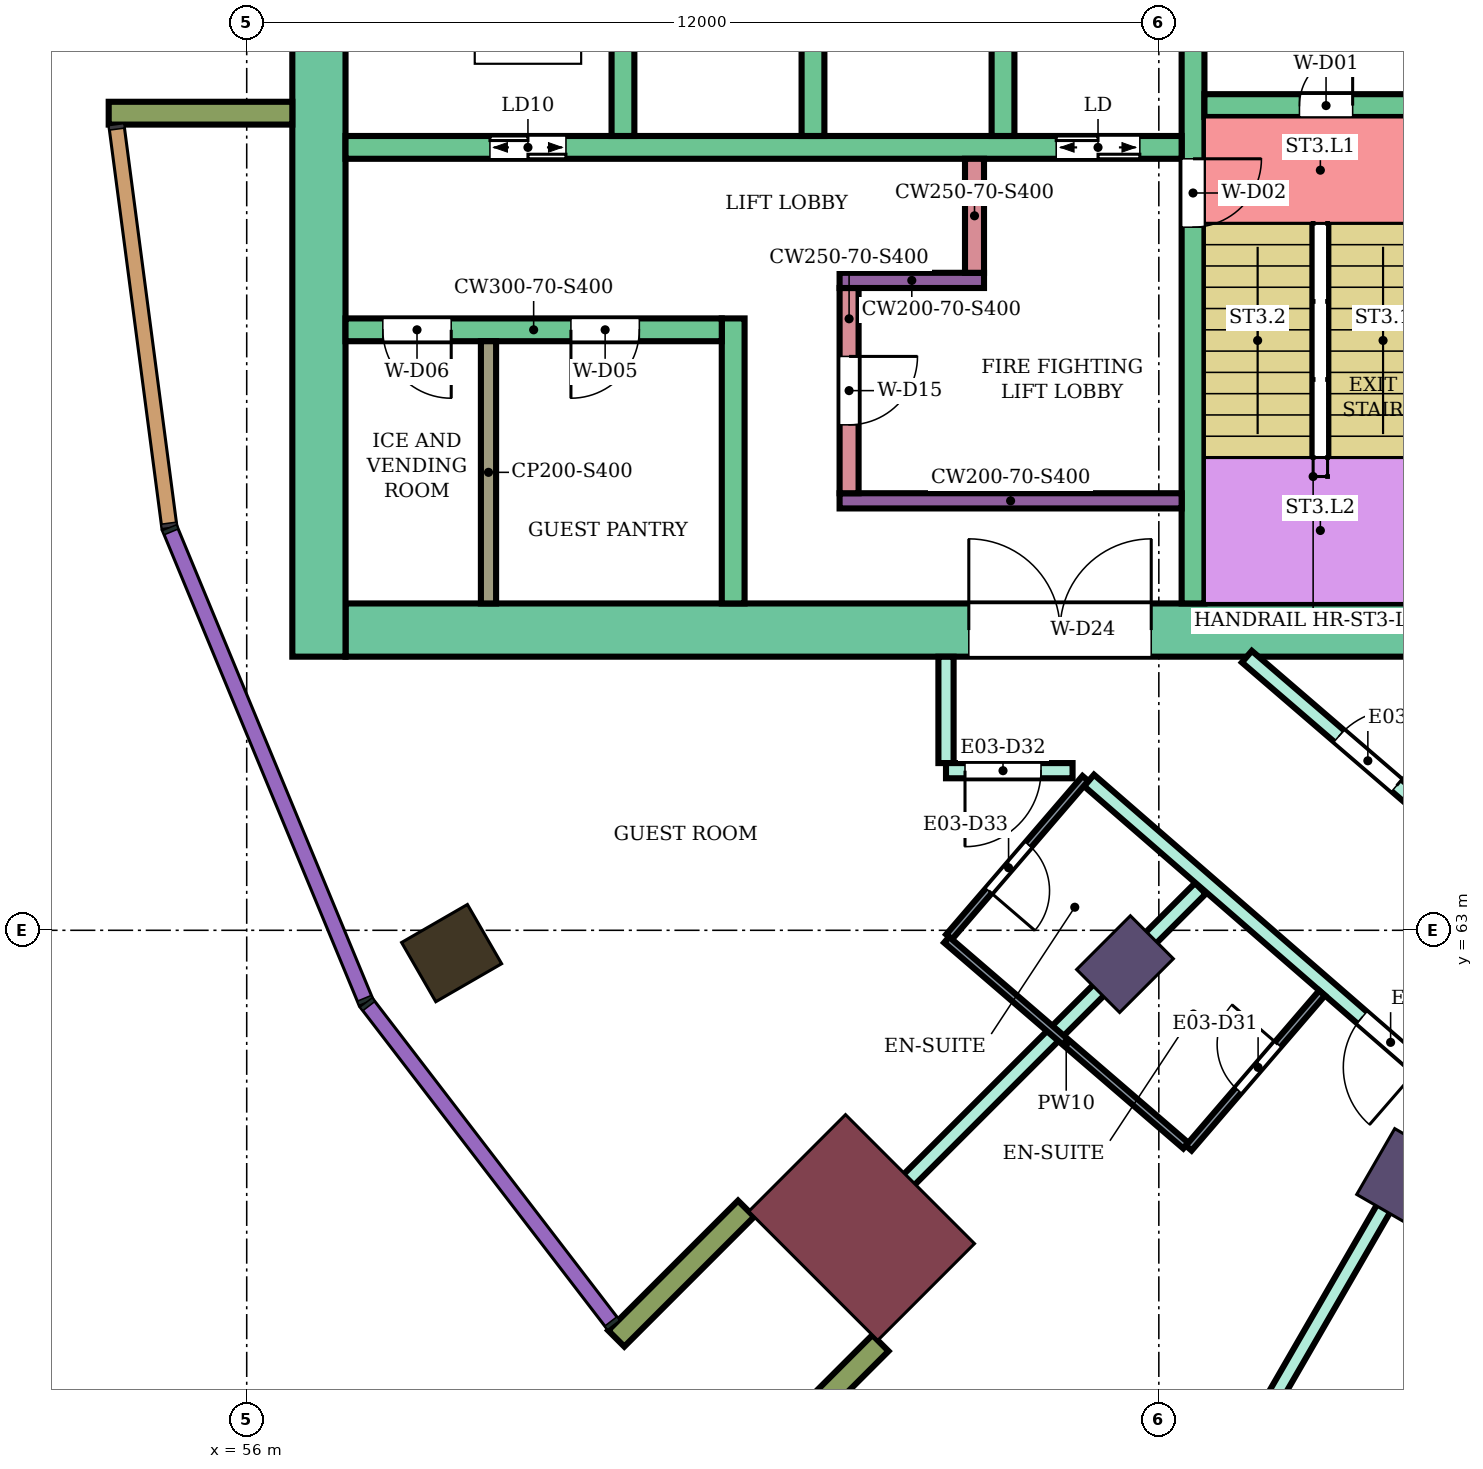
"""IFC4 building model, lengths in metres.
Left out: names, types, materials, properties, quantities, classifications, styles, units other than length and angle.
Written with IfcOpenShell. Run it as: python <this file> out.ifc"""

import sys

from ifc_helpers import new_model, si_unit, direction, frame, frame_2d, origin, origin_2d, place, context, subcontext, project, spatial, rectangle, extrude, element, fill, save


model = new_model("IFC4")
c1 = context("Model", 3, precision=1e-05, world=origin(), true_north=direction((0.0, 1.0)))
c2 = subcontext(c1, "Body", "Model", "MODEL_VIEW")
j1 = project(units=[si_unit("LENGTHUNIT", "METRE"), si_unit("PLANEANGLEUNIT", "RADIAN")], contexts=[c1])
p1 = place(None, origin())
s1 = spatial("IfcSite", under=j1, at=p1, CompositionType="ELEMENT")
p2 = place(p1, origin())
s2 = spatial("IfcBuilding", under=s1, at=p2, CompositionType="ELEMENT")
p3 = place(p2, frame((0.0, 0.0, 145.8)))
s3 = spatial("IfcBuildingStorey", under=s2, at=p3, CompositionType="ELEMENT", Elevation=145.8)
p4 = place(p3, frame((58.696, 62.7, 0.0), z_axis=(0.0, 0.0, 1.0), x_axis=(-0.866025403784, -0.5, 0.0)))
e1 = element("IfcColumn", 1, at=p4, inside=s3, PredefinedType="COLUMN", context=c2, shape_type="SweptSolid", body=[
    extrude(rectangle(XDim=1.0, YDim=0.9, at=origin_2d()), origin(), (0.0, 0.0, 1.0), 3.9),
])
for number, where, z_axis, x_axis in (
    (2, (67.555, 62.555, 0.0), (0.0, 0.0, 1.0), (-0.707, -0.707, 0.0)),
    (3, (71.2, 59.758, 0.0), (0.0, 0.0, 1.0), (-0.5, -0.866, 0.0)),
):
    element("IfcColumn", number, at=place(p3, frame(where, z_axis=z_axis, x_axis=x_axis)), inside=s3, PredefinedType="COLUMN", context=c2, shape_type="SweptSolid", body=[
        extrude(rectangle(XDim=1.0, YDim=0.8, at=origin_2d()), origin(), (0.0, 0.0, 1.0), 3.9),
    ])
p5 = place(p3, frame((64.09, 59.09, 0.0), z_axis=(0.0, 0.0, 1.0), x_axis=(-0.707106781187, -0.707106781187, 0.0)))
e4 = element("IfcColumn", 4, at=p5, inside=s3, PredefinedType="COLUMN", context=c2, shape_type="SweptSolid", body=[
    extrude(rectangle(XDim=1.8, YDim=2.4, at=origin_2d()), origin(), (0.0, 0.0, 1.0), 3.9),
])
p6 = place(p3, frame((72.1, 66.95, 0.0), z_axis=(0.0, 0.0, 1.0), x_axis=(-1.0, 0.0, 0.0)))
e5 = element("IfcWall", 5, at=p6, inside=s3, PredefinedType="SHEAR", context=c2, shape_type="SweptSolid", body=[
    extrude(rectangle(XDim=14.8, YDim=0.7, at=frame_2d((7.4, 0.0))), origin(), (0.0, 0.0, 1.0), 3.5),
])
p7 = place(p6, frame((4.2, 0.0, 0.0)))
e6 = element("IfcOpeningElement", 6, at=p7, cuts=e5, PredefinedType="OPENING", context=c2, shape_type="SweptSolid", body=[
    extrude(rectangle(XDim=2.4, YDim=2.4, at=frame_2d((1.2, 1.2))), frame((0.0, 0.36, 0.0), z_axis=(0.0, -1.0, 0.0), x_axis=(1.0, 0.0, 0.0)), (0.0, 0.0, 1.0), 0.72),
])
p8 = place(p3, frame((56.95, 83.4, 0.0), z_axis=(0.0, 0.0, 1.0), x_axis=(0.0, -1.0, 0.0)))
e7 = element("IfcWall", 7, at=p8, inside=s3, PredefinedType="SHEAR", context=c2, shape_type="SweptSolid", body=[
    extrude(rectangle(XDim=16.8, YDim=0.7, at=frame_2d((8.4, 0.0))), origin(), (0.0, 0.0, 1.0), 3.5),
])
p9 = place(p3, frame((68.45, 75.0, 0.0), z_axis=(0.0, 0.0, 1.0), x_axis=(0.0, -1.0, 0.0)))
e8 = element("IfcWall", 8, at=p9, inside=s3, PredefinedType="SHEAR", context=c2, shape_type="SweptSolid", body=[
    extrude(rectangle(XDim=7.7, YDim=0.3, at=frame_2d((3.85, 0.0))), origin(), (0.0, 0.0, 1.0), 3.5),
])
p10 = place(p9, frame((1.85, 0.0, 0.0)))
e9 = element("IfcOpeningElement", 9, at=p10, cuts=e8, PredefinedType="OPENING", context=c2, shape_type="SweptSolid", body=[
    extrude(rectangle(XDim=0.9, YDim=2.1, at=frame_2d((0.45, 1.05))), frame((0.0, 0.16, 0.0), z_axis=(0.0, -1.0, 0.0), x_axis=(1.0, 0.0, 0.0)), (0.0, 0.0, 1.0), 0.32),
])
p11 = place(p3, frame((71.65, 73.85, 0.0), z_axis=(0.0, 0.0, 1.0), x_axis=(-1.0, 0.0, 0.0)))
e10 = element("IfcWall", 10, at=p11, inside=s3, PredefinedType="SHEAR", context=c2, shape_type="SweptSolid", body=[
    extrude(rectangle(XDim=3.05, YDim=0.3, at=frame_2d((1.525, 0.0))), origin(), (0.0, 0.0, 1.0), 3.5),
])
p12 = place(p11, frame((1.1, 0.0, 0.0)))
e11 = element("IfcOpeningElement", 11, at=p12, cuts=e10, PredefinedType="OPENING", context=c2, shape_type="SweptSolid", body=[
    extrude(rectangle(XDim=0.7, YDim=2.0, at=frame_2d((0.35, 1.0))), frame((0.0, 0.16, 0.0), z_axis=(0.0, -1.0, 0.0), x_axis=(1.0, 0.0, 0.0)), (0.0, 0.0, 1.0), 0.32),
])
p13 = place(p3, frame((68.3, 73.3, 0.0), z_axis=(0.0, 0.0, 1.0), x_axis=(-1.0, 0.0, 0.0)))
e12 = element("IfcWall", 12, at=p13, inside=s3, PredefinedType="SHEAR", context=c2, shape_type="SweptSolid", body=[
    extrude(rectangle(XDim=11.0, YDim=0.3, at=frame_2d((5.5, 0.0))), origin(), (0.0, 0.0, 1.0), 3.5),
])
p14 = place(p13, frame((0.55, 0.0, 0.0)))
e13 = element("IfcOpeningElement", 13, at=p14, cuts=e12, PredefinedType="OPENING", context=c2, shape_type="SweptSolid", body=[
    extrude(rectangle(XDim=1.1, YDim=2.1, at=frame_2d((0.55, 1.05))), frame((0.0, 0.16, 0.0), z_axis=(0.0, -1.0, 0.0), x_axis=(1.0, 0.0, 0.0)), (0.0, 0.0, 1.0), 0.32),
])
p15 = place(p13, frame((8.1, 0.0, 0.0)))
e14 = element("IfcOpeningElement", 14, at=p15, cuts=e12, PredefinedType="OPENING", context=c2, shape_type="SweptSolid", body=[
    extrude(rectangle(XDim=1.0, YDim=2.1, at=frame_2d((0.5, 1.05))), frame((0.0, 0.16, 0.0), z_axis=(0.0, -1.0, 0.0), x_axis=(1.0, 0.0, 0.0)), (0.0, 0.0, 1.0), 0.32),
])
for number, where, z_axis, x_axis in (
    (15, (65.95, 76.0, 0.0), (0.0, 0.0, 1.0), (0.0, -1.0, 0.0)),
    (16, (63.45, 76.0, 0.0), (0.0, 0.0, 1.0), (0.0, -1.0, 0.0)),
    (17, (60.95, 76.0, 0.0), (0.0, 0.0, 1.0), (0.0, -1.0, 0.0)),
):
    element("IfcWall", number, at=place(p3, frame(where, z_axis=z_axis, x_axis=x_axis)), inside=s3, PredefinedType="SHEAR", context=c2, shape_type="SweptSolid", body=[
        extrude(rectangle(XDim=2.55, YDim=0.3, at=frame_2d((1.275, 0.0))), origin(), (0.0, 0.0, 1.0), 3.5),
    ])
p16 = place(p3, frame((68.3, 68.65, 0.0), z_axis=(0.0, 0.0, 1.0), x_axis=(-1.0, 0.0, 0.0)))
e18 = element("IfcWall", 18, at=p16, inside=s3, PredefinedType="SHEAR", context=c2, shape_type="SweptSolid", body=[
    extrude(rectangle(XDim=4.5, YDim=0.2, at=frame_2d((2.25, 0.0))), origin(), (0.0, 0.0, 1.0), 3.5),
])
p17 = place(p3, frame((63.925, 71.45, 0.0), z_axis=(0.0, 0.0, 1.0), x_axis=(0.0, -1.0, 0.0)))
e19 = element("IfcWall", 19, at=p17, inside=s3, PredefinedType="SHEAR", context=c2, shape_type="SweptSolid", body=[
    extrude(rectangle(XDim=2.7, YDim=0.25, at=frame_2d((1.35, 0.0))), origin(), (0.0, 0.0, 1.0), 3.5),
])
p18 = place(p17, frame((0.9, 0.0, 0.0)))
e20 = element("IfcOpeningElement", 20, at=p18, cuts=e19, PredefinedType="OPENING", context=c2, shape_type="SweptSolid", body=[
    extrude(rectangle(XDim=0.9, YDim=2.1, at=frame_2d((0.45, 1.05))), frame((0.0, 0.135, 0.0), z_axis=(0.0, -1.0, 0.0), x_axis=(1.0, 0.0, 0.0)), (0.0, 0.0, 1.0), 0.27),
])
p19 = place(p3, frame((65.7, 71.55, 0.0), z_axis=(0.0, 0.0, 1.0), x_axis=(-1.0, 0.0, 0.0)))
e21 = element("IfcWall", 21, at=p19, inside=s3, PredefinedType="SHEAR", context=c2, shape_type="SweptSolid", body=[
    extrude(rectangle(XDim=1.9, YDim=0.2, at=frame_2d((0.95, 0.0))), origin(), (0.0, 0.0, 1.0), 3.5),
])
p20 = place(p3, frame((65.575, 73.15, 0.0), z_axis=(0.0, 0.0, 1.0), x_axis=(0.0, -1.0, 0.0)))
e22 = element("IfcWall", 22, at=p20, inside=s3, PredefinedType="SHEAR", context=c2, shape_type="SweptSolid", body=[
    extrude(rectangle(XDim=1.5, YDim=0.25, at=frame_2d((0.75, 0.0))), origin(), (0.0, 0.0, 1.0), 3.5),
])
p21 = place(p3, frame((62.4, 71.05, 0.0), z_axis=(0.0, 0.0, 1.0), x_axis=(0.0, -1.0, 0.0)))
e23 = element("IfcWall", 23, at=p21, inside=s3, PredefinedType="SHEAR", context=c2, shape_type="SweptSolid", body=[
    extrude(rectangle(XDim=3.75, YDim=0.3, at=frame_2d((1.875, 0.0))), origin(), (0.0, 0.0, 1.0), 3.5),
])
p22 = place(p3, frame((62.25, 70.9, 0.0), z_axis=(0.0, 0.0, 1.0), x_axis=(-1.0, 0.0, 0.0)))
e24 = element("IfcWall", 24, at=p22, inside=s3, PredefinedType="SHEAR", context=c2, shape_type="SweptSolid", body=[
    extrude(rectangle(XDim=4.95, YDim=0.3, at=frame_2d((2.475, 0.0))), origin(), (0.0, 0.0, 1.0), 3.5),
])
p23 = place(p22, frame((1.084, 0.0, 0.0)))
e25 = element("IfcOpeningElement", 25, at=p23, cuts=e24, PredefinedType="OPENING", context=c2, shape_type="SweptSolid", body=[
    extrude(rectangle(XDim=0.9, YDim=2.1, at=frame_2d((0.45, 1.05))), frame((0.0, 0.16, 0.0), z_axis=(0.0, -1.0, 0.0), x_axis=(1.0, 0.0, 0.0)), (0.0, 0.0, 1.0), 0.32),
])
p24 = place(p22, frame((3.56, 0.0, 0.0)))
e26 = element("IfcOpeningElement", 26, at=p24, cuts=e24, PredefinedType="OPENING", context=c2, shape_type="SweptSolid", body=[
    extrude(rectangle(XDim=0.9, YDim=2.1, at=frame_2d((0.45, 1.05))), frame((0.0, 0.16, 0.0), z_axis=(0.0, -1.0, 0.0), x_axis=(1.0, 0.0, 0.0)), (0.0, 0.0, 1.0), 0.32),
])
for number, where, z_axis, x_axis in (
    (27, (56.6, 73.75, 0.0), (0.0, 0.0, 1.0), (-1.0, 0.0, 0.0)),
    (28, (62.57, 59.338, 0.0), (0.0, 0.0, 1.0), (-0.707, -0.707, 0.0)),
    (29, (64.338, 57.57, 0.0), (0.0, 0.0, 1.0), (-0.707, -0.707, 0.0)),
):
    element("IfcWall", number, at=place(p3, frame(where, z_axis=z_axis, x_axis=x_axis)), inside=s3, PredefinedType="NOTDEFINED", context=c2, shape_type="SweptSolid", body=[
        extrude(rectangle(XDim=2.416, YDim=0.3, at=frame_2d((1.208, 0.0))), origin(), (0.0, 0.0, 1.0), 3.9),
    ])
p25 = place(p3, frame((63.593, 58.599, 0.0), z_axis=(0.0, 0.0, 1.0), x_axis=(0.707228748718, 0.706984792613, 0.0)))
e30 = element("IfcWall", 30, at=p25, inside=s3, PredefinedType="PARTITIONING", context=c2, shape_type="SweptSolid", body=[
    extrude(rectangle(XDim=7.005, YDim=0.2, at=frame_2d((3.503, 0.0))), origin(), (0.0, 0.0, 1.0), 3.45),
])
p26 = place(p3, frame((65.2, 65.2, 0.0), z_axis=(0.0, 0.0, 1.0), x_axis=(0.0, 1.0, 0.0)))
e31 = element("IfcWall", 31, at=p26, inside=s3, PredefinedType="PARTITIONING", context=c2, shape_type="SweptSolid", body=[
    extrude(rectangle(XDim=1.399, YDim=0.2, at=frame_2d((0.7, 0.0))), origin(), (0.0, 0.0, 1.0), 3.45),
])
p27 = place(p3, frame((65.2, 65.1, 0.0), z_axis=(0.0, 0.0, 1.0), x_axis=(1.0, 0.0, 0.0)))
e32 = element("IfcWall", 32, at=p27, inside=s3, PredefinedType="PARTITIONING", context=c2, shape_type="SweptSolid", body=[
    extrude(rectangle(XDim=1.665, YDim=0.2, at=frame_2d((0.833, 0.0))), origin(), (0.0, 0.0, 1.0), 3.45),
])
p28 = place(p27, frame((0.25, 0.0, 0.0)))
e33 = element("IfcOpeningElement", 33, at=p28, cuts=e32, PredefinedType="OPENING", context=c2, shape_type="SweptSolid", body=[
    extrude(rectangle(XDim=1.0, YDim=2.1, at=frame_2d((0.5, 1.05))), frame((0.0, 0.11, 0.0), z_axis=(0.0, -1.0, 0.0), x_axis=(1.0, 0.0, 0.0)), (0.0, 0.0, 1.0), 0.22),
])
p29 = place(p3, frame((67.082, 64.972, 0.0), z_axis=(0.0, 0.0, 1.0), x_axis=(0.755031061605, -0.65568902386, 0.0)))
e34 = element("IfcWall", 34, at=p29, inside=s3, PredefinedType="PARTITIONING", context=c2, shape_type="SweptSolid", body=[
    extrude(rectangle(XDim=6.186, YDim=0.2, at=frame_2d((3.093, 0.0))), origin(), (0.0, 0.0, 1.0), 3.45),
])
p30 = place(p29, frame((4.755, 0.0, 0.0)))
e35 = element("IfcOpeningElement", 35, at=p30, cuts=e34, PredefinedType="OPENING", context=c2, shape_type="SweptSolid", body=[
    extrude(rectangle(XDim=1.0, YDim=2.1, at=frame_2d((0.5, 1.05))), frame((0.0, 0.11, 0.0), z_axis=(0.0, -1.0, 0.0), x_axis=(1.0, 0.0, 0.0)), (0.0, 0.0, 1.0), 0.22),
])
p31 = place(p3, frame((67.097, 52.661, 0.0), z_axis=(0.0, 0.0, 1.0), x_axis=(0.500236379769, 0.865888886841, 0.0)))
e36 = element("IfcWall", 36, at=p31, inside=s3, PredefinedType="PARTITIONING", context=c2, shape_type="SweptSolid", body=[
    extrude(rectangle(XDim=9.375, YDim=0.2, at=frame_2d((4.688, 0.0))), origin(), (0.0, 0.0, 1.0), 3.45),
])
p32 = place(p3, frame((69.158, 66.6, 0.0), z_axis=(0.0, 0.0, 1.0), x_axis=(0.757976058094, -0.652282373943, 0.0)))
e37 = element("IfcWall", 37, at=p32, inside=s3, PredefinedType="PARTITIONING", context=c2, shape_type="SweptSolid", body=[
    extrude(rectangle(XDim=5.16, YDim=0.2, at=frame_2d((2.58, 0.0))), origin(), (0.0, 0.0, 1.0), 3.45),
])
p33 = place(p32, frame((1.6, 0.0, 0.0)))
e38 = element("IfcOpeningElement", 38, at=p33, cuts=e37, PredefinedType="OPENING", context=c2, shape_type="SweptSolid", body=[
    extrude(rectangle(XDim=1.0, YDim=2.1, at=frame_2d((0.5, 1.05))), frame((0.0, 0.11, 0.0), z_axis=(0.0, -1.0, 0.0), x_axis=(1.0, 0.0, 0.0)), (0.0, 0.0, 1.0), 0.22),
])
p34 = place(p3, frame((65.24, 62.913, 0.0), z_axis=(0.0, 0.0, 1.0), x_axis=(0.652069888227, 0.758158862553, 0.0)))
e39 = element("IfcWall", 39, at=p34, inside=s3, PredefinedType="PARTITIONING", context=c2, shape_type="SweptSolid", body=[
    extrude(rectangle(XDim=2.75, YDim=0.1, at=frame_2d((1.375, 0.0))), origin(), (0.0, 0.0, 1.0), 3.45),
])
p35 = place(p34, frame((0.8, 0.0, 0.0)))
e40 = element("IfcOpeningElement", 40, at=p35, cuts=e39, PredefinedType="OPENING", context=c2, shape_type="SweptSolid", body=[
    extrude(rectangle(XDim=0.8, YDim=2.1, at=frame_2d((0.4, 1.05))), frame((0.0, 0.06, 0.0), z_axis=(0.0, -1.0, 0.0), x_axis=(1.0, 0.0, 0.0)), (0.0, 0.0, 1.0), 0.12),
])
p36 = place(p3, frame((65.208, 62.875, 0.0), z_axis=(0.0, 0.0, 1.0), x_axis=(0.757943251005, -0.652320495045, 0.0)))
e41 = element("IfcWall", 41, at=p36, inside=s3, PredefinedType="PARTITIONING", context=c2, shape_type="SweptSolid", body=[
    extrude(rectangle(XDim=4.151, YDim=0.1, at=frame_2d((2.076, 0.0))), origin(), (0.0, 0.0, 1.0), 3.45),
])
p37 = place(p3, frame((68.393, 60.135, 0.0), z_axis=(0.0, 0.0, 1.0), x_axis=(0.652061182569, 0.758166349944, 0.0)))
e42 = element("IfcWall", 42, at=p37, inside=s3, PredefinedType="PARTITIONING", context=c2, shape_type="SweptSolid", body=[
    extrude(rectangle(XDim=2.69, YDim=0.1, at=frame_2d((1.345, 0.0))), origin(), (0.0, 0.0, 1.0), 3.45),
])
p38 = place(p37, frame((1.0, 0.0, 0.0)))
e43 = element("IfcOpeningElement", 43, at=p38, cuts=e42, PredefinedType="OPENING", context=c2, shape_type="SweptSolid", body=[
    extrude(rectangle(XDim=0.8, YDim=2.1, at=frame_2d((0.4, 1.05))), frame((0.0, 0.06, 0.0), z_axis=(0.0, -1.0, 0.0), x_axis=(1.0, 0.0, 0.0)), (0.0, 0.0, 1.0), 0.12),
])
p39 = place(p3, frame((59.181, 70.75, 0.0), z_axis=(0.0, 0.0, 1.0), x_axis=(0.0, -1.0, 0.0)))
e44 = element("IfcWall", 44, at=p39, inside=s3, PredefinedType="PARTITIONING", context=c2, shape_type="SweptSolid", body=[
    extrude(rectangle(XDim=3.45, YDim=0.2, at=frame_2d((1.725, 0.0))), origin(), (0.0, 0.0, 1.0), 3.5),
])
p40 = place(p30, frame((1.0, 0.0, 0.0), z_axis=(0.0, 0.0, 1.0), x_axis=(-1.0, 0.0, 0.0)))
e45 = element("IfcDoor", 45, at=p40, inside=s3, OperationType="SINGLE_SWING_LEFT", PredefinedType="DOOR", context=c2, shape_type="SweptSolid", body=[
    extrude(rectangle(XDim=1.0, YDim=2.1, at=frame_2d((0.5, 1.05))), frame((0.0, 0.025, 0.0), z_axis=(0.0, -1.0, 0.0), x_axis=(1.0, 0.0, 0.0)), (0.0, 0.0, 1.0), 0.05),
])
fill(e35, e45)
p41 = place(p38, origin())
e46 = element("IfcDoor", 46, at=p41, inside=s3, OperationType="SINGLE_SWING_RIGHT", PredefinedType="DOOR", context=c2, shape_type="SweptSolid", body=[
    extrude(rectangle(XDim=0.8, YDim=2.1, at=frame_2d((0.4, 1.05))), frame((0.0, 0.025, 0.0), z_axis=(0.0, -1.0, 0.0), x_axis=(1.0, 0.0, 0.0)), (0.0, 0.0, 1.0), 0.05),
])
fill(e43, e46)
p42 = place(p28, frame((1.0, 0.0, 0.0), z_axis=(0.0, 0.0, 1.0), x_axis=(-1.0, 0.0, 0.0)))
e47 = element("IfcDoor", 47, at=p42, inside=s3, OperationType="SINGLE_SWING_RIGHT", PredefinedType="DOOR", context=c2, shape_type="SweptSolid", body=[
    extrude(rectangle(XDim=1.0, YDim=2.1, at=frame_2d((0.5, 1.05))), frame((0.0, 0.025, 0.0), z_axis=(0.0, -1.0, 0.0), x_axis=(1.0, 0.0, 0.0)), (0.0, 0.0, 1.0), 0.05),
])
fill(e33, e47)
p43 = place(p35, frame((0.8, 0.0, 0.0), z_axis=(0.0, 0.0, 1.0), x_axis=(-1.0, 0.0, 0.0)))
e48 = element("IfcDoor", 48, at=p43, inside=s3, OperationType="SINGLE_SWING_RIGHT", PredefinedType="DOOR", context=c2, shape_type="SweptSolid", body=[
    extrude(rectangle(XDim=0.8, YDim=2.1, at=frame_2d((0.4, 1.05))), frame((0.0, 0.025, 0.0), z_axis=(0.0, -1.0, 0.0), x_axis=(1.0, 0.0, 0.0)), (0.0, 0.0, 1.0), 0.05),
])
fill(e40, e48)
p44 = place(p33, origin())
e49 = element("IfcDoor", 49, at=p44, inside=s3, OperationType="SINGLE_SWING_RIGHT", PredefinedType="DOOR", context=c2, shape_type="SweptSolid", body=[
    extrude(rectangle(XDim=1.0, YDim=2.1, at=frame_2d((0.5, 1.05))), frame((0.0, 0.025, 0.0), z_axis=(0.0, -1.0, 0.0), x_axis=(1.0, 0.0, 0.0)), (0.0, 0.0, 1.0), 0.05),
])
fill(e38, e49)
p45 = place(p12, frame((0.7, 0.0, 0.0), z_axis=(0.0, 0.0, 1.0), x_axis=(-1.0, 0.0, 0.0)))
e50 = element("IfcDoor", 50, at=p45, inside=s3, OperationType="SINGLE_SWING_RIGHT", PredefinedType="DOOR", context=c2, shape_type="SweptSolid", body=[
    extrude(rectangle(XDim=0.7, YDim=2.0, at=frame_2d((0.35, 1.0))), frame((0.0, 0.025, 0.0), z_axis=(0.0, -1.0, 0.0), x_axis=(1.0, 0.0, 0.0)), (0.0, 0.0, 1.0), 0.05),
])
fill(e11, e50)
p46 = place(p10, origin())
e51 = element("IfcDoor", 51, at=p46, inside=s3, OperationType="SINGLE_SWING_LEFT", PredefinedType="DOOR", context=c2, shape_type="SweptSolid", body=[
    extrude(rectangle(XDim=0.9, YDim=2.1, at=frame_2d((0.45, 1.05))), frame((0.0, 0.025, 0.0), z_axis=(0.0, -1.0, 0.0), x_axis=(1.0, 0.0, 0.0)), (0.0, 0.0, 1.0), 0.05),
])
fill(e9, e51)
p47 = place(p14, origin())
e52 = element("IfcDoor", 52, at=p47, inside=s3, OperationType="DOUBLE_DOOR_SLIDING", PredefinedType="DOOR", context=c2, shape_type="SweptSolid", body=[
    extrude(rectangle(XDim=1.1, YDim=2.1, at=frame_2d((0.55, 1.05))), frame((0.0, 0.025, 0.0), z_axis=(0.0, -1.0, 0.0), x_axis=(1.0, 0.0, 0.0)), (0.0, 0.0, 1.0), 0.05),
])
fill(e13, e52)
p48 = place(p15, origin())
e53 = element("IfcDoor", 53, at=p48, inside=s3, OperationType="DOUBLE_DOOR_SLIDING", PredefinedType="DOOR", context=c2, shape_type="SweptSolid", body=[
    extrude(rectangle(XDim=1.0, YDim=2.1, at=frame_2d((0.5, 1.05))), frame((0.0, 0.025, 0.0), z_axis=(0.0, -1.0, 0.0), x_axis=(1.0, 0.0, 0.0)), (0.0, 0.0, 1.0), 0.05),
])
fill(e14, e53)
p49 = place(p18, origin())
e54 = element("IfcDoor", 54, at=p49, inside=s3, OperationType="SINGLE_SWING_LEFT", PredefinedType="DOOR", context=c2, shape_type="SweptSolid", body=[
    extrude(rectangle(XDim=0.9, YDim=2.1, at=frame_2d((0.45, 1.05))), frame((0.0, 0.025, 0.0), z_axis=(0.0, -1.0, 0.0), x_axis=(1.0, 0.0, 0.0)), (0.0, 0.0, 1.0), 0.05),
])
fill(e20, e54)
p50 = place(p23, origin())
e55 = element("IfcDoor", 55, at=p50, inside=s3, OperationType="SINGLE_SWING_RIGHT", PredefinedType="DOOR", context=c2, shape_type="SweptSolid", body=[
    extrude(rectangle(XDim=0.9, YDim=2.1, at=frame_2d((0.45, 1.05))), frame((0.0, 0.025, 0.0), z_axis=(0.0, -1.0, 0.0), x_axis=(1.0, 0.0, 0.0)), (0.0, 0.0, 1.0), 0.05),
])
fill(e25, e55)
p51 = place(p24, origin())
e56 = element("IfcDoor", 56, at=p51, inside=s3, OperationType="SINGLE_SWING_LEFT", PredefinedType="DOOR", context=c2, shape_type="SweptSolid", body=[
    extrude(rectangle(XDim=0.9, YDim=2.1, at=frame_2d((0.45, 1.05))), frame((0.0, 0.025, 0.0), z_axis=(0.0, -1.0, 0.0), x_axis=(1.0, 0.0, 0.0)), (0.0, 0.0, 1.0), 0.05),
])
fill(e26, e56)
p52 = place(p7, frame((2.4, 0.0, 0.0), z_axis=(0.0, 0.0, 1.0), x_axis=(-1.0, 0.0, 0.0)))
e57 = element("IfcDoor", 57, at=p52, inside=s3, OperationType="DOUBLE_DOOR_SINGLE_SWING", PredefinedType="DOOR", context=c2, shape_type="SweptSolid", body=[
    extrude(rectangle(XDim=2.4, YDim=2.4, at=frame_2d((1.2, 1.2))), frame((0.0, 0.025, 0.0), z_axis=(0.0, -1.0, 0.0), x_axis=(1.0, 0.0, 0.0)), (0.0, 0.0, 1.0), 0.05),
])
fill(e6, e57)
save(model, sys.argv[1])
